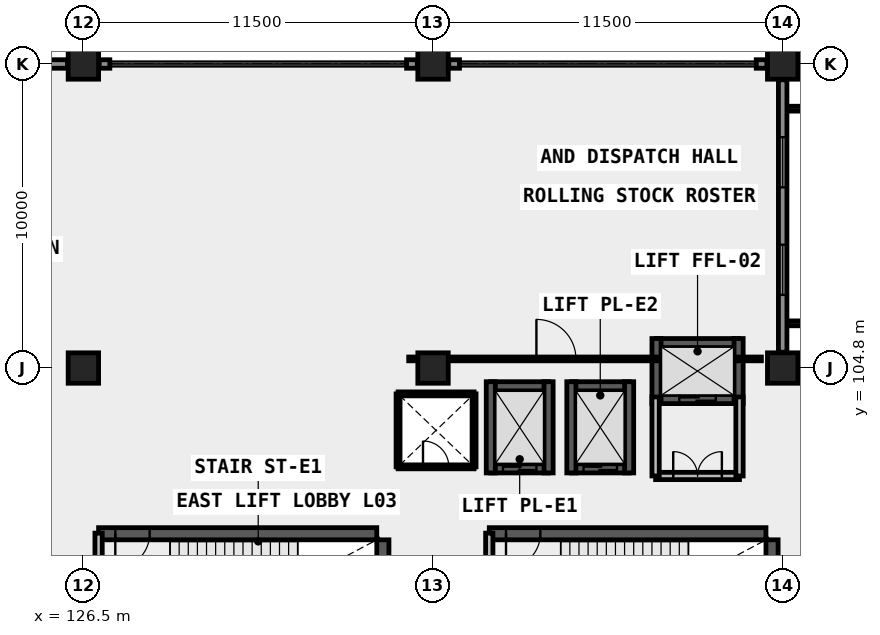
"""IFC4 building model, lengths in metres.
Left out: names, types, materials, properties, quantities, classifications, styles, units other than length and angle.
Written with IfcOpenShell. Run it as: python <this file> out.ifc"""

import sys

from ifc_helpers import new_model, si_unit, direction, frame, frame_2d, origin, origin_2d, place, context, subcontext, project, spatial, rectangle, extrude, element, fill, save


model = new_model("IFC4")
c1 = context("Model", 3, precision=1e-05, world=origin(), true_north=direction((0.0, 1.0)))
c2 = subcontext(c1, "Body", "Model", "MODEL_VIEW")
j1 = project(units=[si_unit("LENGTHUNIT", "METRE"), si_unit("PLANEANGLEUNIT", "RADIAN")], contexts=[c1])
p1 = place(None, origin())
s1 = spatial("IfcSite", under=j1, at=p1, CompositionType="ELEMENT")
p2 = place(p1, origin())
s2 = spatial("IfcBuilding", under=s1, at=p2, CompositionType="ELEMENT")
p3 = place(p2, frame((0.0, 0.0, 13.8)))
s3 = spatial("IfcBuildingStorey", under=s2, at=p3, CompositionType="ELEMENT", Elevation=13.8)
for number, where, z_axis, x_axis in (
    (1, (126.5, 104.8, 0.0), (0.0, 0.0, 1.0), (1.0, 0.0, 0.0)),
    (2, (126.5, 114.8, 0.0), (0.0, 0.0, 1.0), (1.0, 0.0, 0.0)),
    (3, (138.0, 104.8, 0.0), (0.0, 0.0, 1.0), (1.0, 0.0, 0.0)),
    (4, (138.0, 114.8, 0.0), (0.0, 0.0, 1.0), (1.0, 0.0, 0.0)),
    (5, (149.5, 104.8, 0.0), (0.0, 0.0, 1.0), (1.0, 0.0, 0.0)),
    (6, (149.5, 114.8, 0.0), (0.0, 0.0, 1.0), (1.0, 0.0, 0.0)),
):
    element("IfcColumn", number, at=place(p3, frame(where, z_axis=z_axis, x_axis=x_axis)), inside=s3, PredefinedType="COLUMN", context=c2, shape_type="SweptSolid", body=[
        extrude(rectangle(XDim=1.0, YDim=1.0, at=origin_2d()), origin(), (0.0, 0.0, 1.0), 4.5),
    ])
p4 = place(p3, frame((145.35, 103.78, 0.0), z_axis=(0.0, 0.0, 1.0), x_axis=(1.0, 0.0, 0.0)))
e7 = element("IfcWall", 7, at=p4, inside=s3, PredefinedType="SHEAR", context=c2, shape_type="SweptSolid", body=[
    extrude(rectangle(XDim=2.7, YDim=0.3, at=frame_2d((1.35, 0.0))), origin(), (0.0, 0.0, 1.0), 4.5),
])
p5 = place(p4, frame((0.75, 0.0, 0.0)))
e8 = element("IfcOpeningElement", 8, at=p5, cuts=e7, PredefinedType="OPENING", context=c2, shape_type="SweptSolid", body=[
    extrude(rectangle(XDim=1.2, YDim=2.15, at=frame_2d((0.6, 1.075))), frame((0.0, 0.16, 0.0), z_axis=(0.0, -1.0, 0.0), x_axis=(1.0, 0.0, 0.0)), (0.0, 0.0, 1.0), 0.32),
])
p6 = place(p3, frame((145.35, 105.62, 0.0), z_axis=(0.0, 0.0, 1.0), x_axis=(1.0, 0.0, 0.0)))
e9 = element("IfcWall", 9, at=p6, inside=s3, PredefinedType="SHEAR", context=c2, shape_type="SweptSolid", body=[
    extrude(rectangle(XDim=2.7, YDim=0.3, at=frame_2d((1.35, 0.0))), origin(), (0.0, 0.0, 1.0), 4.5),
])
for number, where, z_axis, x_axis in (
    (10, (145.35, 103.63, 0.0), (0.0, 0.0, 1.0), (0.0, 1.0, 0.0)),
    (11, (148.05, 103.63, 0.0), (0.0, 0.0, 1.0), (0.0, 1.0, 0.0)),
):
    element("IfcWall", number, at=place(p3, frame(where, z_axis=z_axis, x_axis=x_axis)), inside=s3, PredefinedType="SHEAR", context=c2, shape_type="SweptSolid", body=[
        extrude(rectangle(XDim=2.14, YDim=0.3, at=frame_2d((1.07, 0.0))), origin(), (0.0, 0.0, 1.0), 4.5),
    ])
p7 = place(p3, frame((139.9, 101.5, 0.0), z_axis=(0.0, 0.0, 1.0), x_axis=(1.0, 0.0, 0.0)))
e12 = element("IfcWall", 12, at=p7, inside=s3, PredefinedType="SHEAR", context=c2, shape_type="SweptSolid", body=[
    extrude(rectangle(XDim=1.9, YDim=0.3, at=frame_2d((0.95, 0.0))), origin(), (0.0, 0.0, 1.0), 4.5),
])
p8 = place(p7, frame((0.4, 0.0, 0.0)))
e13 = element("IfcOpeningElement", 13, at=p8, cuts=e12, PredefinedType="OPENING", context=c2, shape_type="SweptSolid", body=[
    extrude(rectangle(XDim=1.1, YDim=2.15, at=frame_2d((0.55, 1.075))), frame((0.0, 0.16, 0.0), z_axis=(0.0, -1.0, 0.0), x_axis=(1.0, 0.0, 0.0)), (0.0, 0.0, 1.0), 0.32),
])
p9 = place(p3, frame((139.9, 104.2, 0.0), z_axis=(0.0, 0.0, 1.0), x_axis=(1.0, 0.0, 0.0)))
e14 = element("IfcWall", 14, at=p9, inside=s3, PredefinedType="SHEAR", context=c2, shape_type="SweptSolid", body=[
    extrude(rectangle(XDim=1.9, YDim=0.3, at=frame_2d((0.95, 0.0))), origin(), (0.0, 0.0, 1.0), 4.5),
])
for number, where, z_axis, x_axis in (
    (15, (139.9, 101.35, 0.0), (0.0, 0.0, 1.0), (0.0, 1.0, 0.0)),
    (16, (141.8, 101.35, 0.0), (0.0, 0.0, 1.0), (0.0, 1.0, 0.0)),
):
    element("IfcWall", number, at=place(p3, frame(where, z_axis=z_axis, x_axis=x_axis)), inside=s3, PredefinedType="SHEAR", context=c2, shape_type="SweptSolid", body=[
        extrude(rectangle(XDim=3.0, YDim=0.3, at=frame_2d((1.5, 0.0))), origin(), (0.0, 0.0, 1.0), 4.5),
    ])
p10 = place(p3, frame((142.55, 101.5, 0.0), z_axis=(0.0, 0.0, 1.0), x_axis=(1.0, 0.0, 0.0)))
e17 = element("IfcWall", 17, at=p10, inside=s3, PredefinedType="SHEAR", context=c2, shape_type="SweptSolid", body=[
    extrude(rectangle(XDim=1.9, YDim=0.3, at=frame_2d((0.95, 0.0))), origin(), (0.0, 0.0, 1.0), 4.5),
])
p11 = place(p10, frame((0.4, 0.0, 0.0)))
e18 = element("IfcOpeningElement", 18, at=p11, cuts=e17, PredefinedType="OPENING", context=c2, shape_type="SweptSolid", body=[
    extrude(rectangle(XDim=1.1, YDim=2.15, at=frame_2d((0.55, 1.075))), frame((0.0, 0.16, 0.0), z_axis=(0.0, -1.0, 0.0), x_axis=(1.0, 0.0, 0.0)), (0.0, 0.0, 1.0), 0.32),
])
p12 = place(p3, frame((142.55, 104.2, 0.0), z_axis=(0.0, 0.0, 1.0), x_axis=(1.0, 0.0, 0.0)))
e19 = element("IfcWall", 19, at=p12, inside=s3, PredefinedType="SHEAR", context=c2, shape_type="SweptSolid", body=[
    extrude(rectangle(XDim=1.9, YDim=0.3, at=frame_2d((0.95, 0.0))), origin(), (0.0, 0.0, 1.0), 4.5),
])
for number, where, z_axis, x_axis in (
    (20, (142.55, 101.35, 0.0), (0.0, 0.0, 1.0), (0.0, 1.0, 0.0)),
    (21, (144.45, 101.35, 0.0), (0.0, 0.0, 1.0), (0.0, 1.0, 0.0)),
):
    element("IfcWall", number, at=place(p3, frame(where, z_axis=z_axis, x_axis=x_axis)), inside=s3, PredefinedType="SHEAR", context=c2, shape_type="SweptSolid", body=[
        extrude(rectangle(XDim=3.0, YDim=0.3, at=frame_2d((1.5, 0.0))), origin(), (0.0, 0.0, 1.0), 4.5),
    ])
p13 = place(p3, frame((127.0, 99.35, 0.0), z_axis=(0.0, 0.0, 1.0), x_axis=(1.0, 0.0, 0.0)))
e22 = element("IfcWall", 22, at=p13, inside=s3, PredefinedType="SHEAR", context=c2, shape_type="SweptSolid", body=[
    extrude(rectangle(XDim=9.15, YDim=0.4, at=frame_2d((4.575, 0.0))), origin(), (0.0, 0.0, 1.0), 4.5),
])
p14 = place(p13, frame((0.55, 0.0, 0.0)))
e23 = element("IfcOpeningElement", 23, at=p14, cuts=e22, PredefinedType="OPENING", context=c2, shape_type="SweptSolid", body=[
    extrude(rectangle(XDim=1.13, YDim=2.15, at=frame_2d((0.565, 1.075))), frame((0.0, 0.21, 0.0), z_axis=(0.0, -1.0, 0.0), x_axis=(1.0, 0.0, 0.0)), (0.0, 0.0, 1.0), 0.42),
])
p15 = place(p3, frame((136.35, 95.55, 0.0), z_axis=(0.0, 0.0, 1.0), x_axis=(0.0, 1.0, 0.0)))
e24 = element("IfcWall", 24, at=p15, inside=s3, PredefinedType="SHEAR", context=c2, shape_type="SweptSolid", body=[
    extrude(rectangle(XDim=3.6, YDim=0.4, at=frame_2d((1.8, 0.0))), origin(), (0.0, 0.0, 1.0), 4.5),
])
p16 = place(p3, frame((139.85, 99.35, 0.0), z_axis=(0.0, 0.0, 1.0), x_axis=(1.0, 0.0, 0.0)))
e25 = element("IfcWall", 25, at=p16, inside=s3, PredefinedType="SHEAR", context=c2, shape_type="SweptSolid", body=[
    extrude(rectangle(XDim=9.1, YDim=0.4, at=frame_2d((4.55, 0.0))), origin(), (0.0, 0.0, 1.0), 4.5),
])
p17 = place(p16, frame((0.55, 0.0, 0.0)))
e26 = element("IfcOpeningElement", 26, at=p17, cuts=e25, PredefinedType="OPENING", context=c2, shape_type="SweptSolid", body=[
    extrude(rectangle(XDim=1.13, YDim=2.15, at=frame_2d((0.565, 1.075))), frame((0.0, 0.21, 0.0), z_axis=(0.0, -1.0, 0.0), x_axis=(1.0, 0.0, 0.0)), (0.0, 0.0, 1.0), 0.42),
])
p18 = place(p3, frame((149.15, 95.32, 0.0), z_axis=(0.0, 0.0, 1.0), x_axis=(0.0, 1.0, 0.0)))
e27 = element("IfcWall", 27, at=p18, inside=s3, PredefinedType="SHEAR", context=c2, shape_type="SweptSolid", body=[
    extrude(rectangle(XDim=3.83, YDim=0.4, at=frame_2d((1.915, 0.0))), origin(), (0.0, 0.0, 1.0), 4.5),
])
p19 = place(p3, frame((150.02, 104.8, 0.0), z_axis=(0.0, 0.0, 1.0), x_axis=(1.0, 0.0, 0.0)))
e28 = element("IfcWall", 28, at=p19, inside=s3, PredefinedType="SOLIDWALL", context=c2, shape_type="SweptSolid", body=[
    extrude(rectangle(XDim=10.46, YDim=0.28, at=frame_2d((5.23, 0.0))), origin(), (0.0, 0.0, 1.0), 3.45),
])
p20 = place(p19, frame((2.12, 0.0, 0.85)))
e29 = element("IfcOpeningElement", 29, at=p20, cuts=e28, PredefinedType="OPENING", context=c2, shape_type="SweptSolid", body=[
    extrude(rectangle(XDim=2.05, YDim=1.9, at=frame_2d((1.025, 0.95))), frame((0.0, 0.15, 0.0), z_axis=(0.0, -1.0, 0.0), x_axis=(1.0, 0.0, 0.0)), (0.0, 0.0, 1.0), 0.3),
])
p21 = place(p19, frame((6.29, 0.0, 0.85)))
e30 = element("IfcOpeningElement", 30, at=p21, cuts=e28, PredefinedType="OPENING", context=c2, shape_type="SweptSolid", body=[
    extrude(rectangle(XDim=2.05, YDim=1.9, at=frame_2d((1.025, 0.95))), frame((0.0, 0.15, 0.0), z_axis=(0.0, -1.0, 0.0), x_axis=(1.0, 0.0, 0.0)), (0.0, 0.0, 1.0), 0.3),
])
p22 = place(p3, frame((149.5, 105.32, 0.0), z_axis=(0.0, 0.0, 1.0), x_axis=(0.0, 1.0, 0.0)))
e31 = element("IfcWall", 31, at=p22, inside=s3, PredefinedType="SOLIDWALL", context=c2, shape_type="SweptSolid", body=[
    extrude(rectangle(XDim=8.96, YDim=0.28, at=frame_2d((4.48, 0.0))), origin(), (0.0, 0.0, 1.0), 3.45),
])
p23 = place(p22, frame((1.887, 0.0, 0.85)))
e32 = element("IfcOpeningElement", 32, at=p23, cuts=e31, PredefinedType="OPENING", context=c2, shape_type="SweptSolid", body=[
    extrude(rectangle(XDim=1.65, YDim=1.9, at=frame_2d((0.825, 0.95))), frame((0.0, 0.15, 0.0), z_axis=(0.0, -1.0, 0.0), x_axis=(1.0, 0.0, 0.0)), (0.0, 0.0, 1.0), 0.3),
])
p24 = place(p22, frame((5.423, 0.0, 0.85)))
e33 = element("IfcOpeningElement", 33, at=p24, cuts=e31, PredefinedType="OPENING", context=c2, shape_type="SweptSolid", body=[
    extrude(rectangle(XDim=1.65, YDim=1.9, at=frame_2d((0.825, 0.95))), frame((0.0, 0.15, 0.0), z_axis=(0.0, -1.0, 0.0), x_axis=(1.0, 0.0, 0.0)), (0.0, 0.0, 1.0), 0.3),
])
p25 = place(p3, frame((115.52, 114.8, 0.0), z_axis=(0.0, 0.0, 1.0), x_axis=(1.0, 0.0, 0.0)))
e34 = element("IfcWall", 34, at=p25, inside=s3, PredefinedType="SOLIDWALL", context=c2, shape_type="SweptSolid", body=[
    extrude(rectangle(XDim=10.46, YDim=0.28, at=frame_2d((5.23, 0.0))), origin(), (0.0, 0.0, 1.0), 3.45),
])
p26 = place(p25, frame((2.12, 0.0, 0.85)))
e35 = element("IfcOpeningElement", 35, at=p26, cuts=e34, PredefinedType="OPENING", context=c2, shape_type="SweptSolid", body=[
    extrude(rectangle(XDim=2.05, YDim=1.9, at=frame_2d((1.025, 0.95))), frame((0.0, 0.15, 0.0), z_axis=(0.0, -1.0, 0.0), x_axis=(1.0, 0.0, 0.0)), (0.0, 0.0, 1.0), 0.3),
])
p27 = place(p25, frame((6.29, 0.0, 0.85)))
e36 = element("IfcOpeningElement", 36, at=p27, cuts=e34, PredefinedType="OPENING", context=c2, shape_type="SweptSolid", body=[
    extrude(rectangle(XDim=2.05, YDim=1.9, at=frame_2d((1.025, 0.95))), frame((0.0, 0.15, 0.0), z_axis=(0.0, -1.0, 0.0), x_axis=(1.0, 0.0, 0.0)), (0.0, 0.0, 1.0), 0.3),
])
for number, where, z_axis, x_axis in (
    (37, (127.02, 114.8, 0.0), (0.0, 0.0, 1.0), (1.0, 0.0, 0.0)),
    (38, (137.13, 114.8, 0.0), (0.0, 0.0, 1.0), (1.0, 0.0, 0.0)),
    (39, (138.52, 114.8, 0.0), (0.0, 0.0, 1.0), (1.0, 0.0, 0.0)),
    (40, (148.63, 114.8, 0.0), (0.0, 0.0, 1.0), (1.0, 0.0, 0.0)),
):
    element("IfcWall", number, at=place(p3, frame(where, z_axis=z_axis, x_axis=x_axis)), inside=s3, PredefinedType="SOLIDWALL", context=c2, shape_type="SweptSolid", body=[
        extrude(rectangle(XDim=0.35, YDim=0.28, at=frame_2d((0.175, 0.0))), origin(), (0.0, 0.0, 1.0), 4.23),
    ])
p28 = place(p3, frame((127.0, 95.33, 0.0), z_axis=(0.0, 0.0, 1.0), x_axis=(0.0, 1.0, 0.0)))
e41 = element("IfcWall", 41, at=p28, inside=s3, PredefinedType="SOLIDWALL", context=c2, shape_type="SweptSolid", body=[
    extrude(rectangle(XDim=4.04, YDim=0.24, at=frame_2d((2.02, 0.0))), origin(), (0.0, 0.0, 1.0), 4.22),
])
p29 = place(p28, frame((1.45, 0.0, 0.0)))
e42 = element("IfcOpeningElement", 42, at=p29, cuts=e41, PredefinedType="OPENING", context=c2, shape_type="SweptSolid", body=[
    extrude(rectangle(XDim=1.13, YDim=2.15, at=frame_2d((0.565, 1.075))), frame((0.0, 0.13, 0.0), z_axis=(0.0, -1.0, 0.0), x_axis=(1.0, 0.0, 0.0)), (0.0, 0.0, 1.0), 0.26),
])
p30 = place(p3, frame((139.85, 95.33, 0.0), z_axis=(0.0, 0.0, 1.0), x_axis=(0.0, 1.0, 0.0)))
e43 = element("IfcWall", 43, at=p30, inside=s3, PredefinedType="SOLIDWALL", context=c2, shape_type="SweptSolid", body=[
    extrude(rectangle(XDim=4.04, YDim=0.24, at=frame_2d((2.02, 0.0))), origin(), (0.0, 0.0, 1.0), 4.22),
])
p31 = place(p30, frame((1.45, 0.0, 0.0)))
e44 = element("IfcOpeningElement", 44, at=p31, cuts=e43, PredefinedType="OPENING", context=c2, shape_type="SweptSolid", body=[
    extrude(rectangle(XDim=1.13, YDim=2.15, at=frame_2d((0.565, 1.075))), frame((0.0, 0.13, 0.0), z_axis=(0.0, -1.0, 0.0), x_axis=(1.0, 0.0, 0.0)), (0.0, 0.0, 1.0), 0.26),
])
p32 = place(p3, frame((145.32, 101.25, 0.0), z_axis=(0.0, 0.0, 1.0), x_axis=(1.0, 0.0, 0.0)))
e45 = element("IfcWall", 45, at=p32, inside=s3, PredefinedType="SOLIDWALL", context=c2, shape_type="SweptSolid", body=[
    extrude(rectangle(XDim=2.76, YDim=0.24, at=frame_2d((1.38, 0.0))), origin(), (0.0, 0.0, 1.0), 4.22),
])
p33 = place(p32, frame((0.58, 0.0, 0.0)))
e46 = element("IfcOpeningElement", 46, at=p33, cuts=e45, PredefinedType="OPENING", context=c2, shape_type="SweptSolid", body=[
    extrude(rectangle(XDim=1.6, YDim=2.15, at=frame_2d((0.8, 1.075))), frame((0.0, 0.13, 0.0), z_axis=(0.0, -1.0, 0.0), x_axis=(1.0, 0.0, 0.0)), (0.0, 0.0, 1.0), 0.26),
])
for number, where, z_axis, x_axis in (
    (47, (145.32, 101.25, 0.0), (0.0, 0.0, 1.0), (0.0, 1.0, 0.0)),
    (48, (148.08, 101.25, 0.0), (0.0, 0.0, 1.0), (0.0, 1.0, 0.0)),
):
    element("IfcWall", number, at=place(p3, frame(where, z_axis=z_axis, x_axis=x_axis)), inside=s3, PredefinedType="SOLIDWALL", context=c2, shape_type="SweptSolid", body=[
        extrude(rectangle(XDim=2.6, YDim=0.24, at=frame_2d((1.3, 0.0))), origin(), (0.0, 0.0, 1.0), 4.22),
    ])
p34 = place(p3, frame((136.85, 101.55, 0.0), z_axis=(0.0, 0.0, 1.0), x_axis=(1.0, 0.0, 0.0)))
e49 = element("IfcWall", 49, at=p34, inside=s3, PredefinedType="PLUMBINGWALL", context=c2, shape_type="SweptSolid", body=[
    extrude(rectangle(XDim=2.5, YDim=0.13, at=frame_2d((1.25, 0.0))), origin(), (0.0, 0.0, 1.0), 4.22),
])
p35 = place(p34, frame((0.82, 0.0, 0.0)))
e50 = element("IfcOpeningElement", 50, at=p35, cuts=e49, PredefinedType="OPENING", context=c2, shape_type="SweptSolid", body=[
    extrude(rectangle(XDim=0.85, YDim=2.0, at=frame_2d((0.425, 1.0))), frame((0.0, 0.075, 0.0), z_axis=(0.0, -1.0, 0.0), x_axis=(1.0, 0.0, 0.0)), (0.0, 0.0, 1.0), 0.15),
])
for number, where, z_axis, x_axis in (
    (51, (136.85, 101.55, 0.0), (0.0, 0.0, 1.0), (0.0, 1.0, 0.0)),
    (52, (139.35, 101.55, 0.0), (0.0, 0.0, 1.0), (0.0, 1.0, 0.0)),
):
    element("IfcWall", number, at=place(p3, frame(where, z_axis=z_axis, x_axis=x_axis)), inside=s3, PredefinedType="PLUMBINGWALL", context=c2, shape_type="SweptSolid", body=[
        extrude(rectangle(XDim=2.4, YDim=0.13, at=frame_2d((1.2, 0.0))), origin(), (0.0, 0.0, 1.0), 4.22),
    ])
p36 = place(p3, frame((136.85, 103.95, 0.0), z_axis=(0.0, 0.0, 1.0), x_axis=(1.0, 0.0, 0.0)))
e53 = element("IfcWall", 53, at=p36, inside=s3, PredefinedType="PLUMBINGWALL", context=c2, shape_type="SweptSolid", body=[
    extrude(rectangle(XDim=2.5, YDim=0.13, at=frame_2d((1.25, 0.0))), origin(), (0.0, 0.0, 1.0), 4.22),
])
p37 = place(p3, frame((137.2, 105.1, 0.0), z_axis=(0.0, 0.0, 1.0), x_axis=(1.0, 0.0, 0.0)))
e54 = element("IfcWall", 54, at=p37, inside=s3, PredefinedType="MOVABLE", context=c2, shape_type="SweptSolid", body=[
    extrude(rectangle(XDim=11.6, YDim=0.125, at=frame_2d((5.8, 0.0))), origin(), (0.0, 0.0, 1.0), 4.22),
])
p38 = place(p37, frame((4.2, 0.0, 0.0)))
e55 = element("IfcOpeningElement", 55, at=p38, cuts=e54, PredefinedType="OPENING", context=c2, shape_type="SweptSolid", body=[
    extrude(rectangle(XDim=1.3, YDim=2.2, at=frame_2d((0.65, 1.1))), frame((0.0, 0.073, 0.0), z_axis=(0.0, -1.0, 0.0), x_axis=(1.0, 0.0, 0.0)), (0.0, 0.0, 1.0), 0.145),
])
p39 = place(p23, origin())
e56 = element("IfcWindow", 56, at=p39, inside=s3, PartitioningType="SINGLE_PANEL", PredefinedType="WINDOW", context=c2, shape_type="SweptSolid", body=[
    extrude(rectangle(XDim=1.65, YDim=1.9, at=frame_2d((0.825, 0.95))), frame((0.0, 0.03, 0.0), z_axis=(0.0, -1.0, 0.0), x_axis=(1.0, 0.0, 0.0)), (0.0, 0.0, 1.0), 0.06),
])
fill(e32, e56)
p40 = place(p24, origin())
e57 = element("IfcWindow", 57, at=p40, inside=s3, PartitioningType="SINGLE_PANEL", PredefinedType="WINDOW", context=c2, shape_type="SweptSolid", body=[
    extrude(rectangle(XDim=1.65, YDim=1.9, at=frame_2d((0.825, 0.95))), frame((0.0, 0.03, 0.0), z_axis=(0.0, -1.0, 0.0), x_axis=(1.0, 0.0, 0.0)), (0.0, 0.0, 1.0), 0.06),
])
fill(e33, e57)
p41 = place(p5, origin())
e58 = element("IfcDoor", 58, at=p41, inside=s3, OperationType="SLIDING_TO_RIGHT", PredefinedType="DOOR", context=c2, shape_type="SweptSolid", body=[
    extrude(rectangle(XDim=1.2, YDim=2.15, at=frame_2d((0.6, 1.075))), frame((0.0, 0.025, 0.0), z_axis=(0.0, -1.0, 0.0), x_axis=(1.0, 0.0, 0.0)), (0.0, 0.0, 1.0), 0.05),
])
fill(e8, e58)
p42 = place(p8, origin())
e59 = element("IfcDoor", 59, at=p42, inside=s3, OperationType="SLIDING_TO_LEFT", PredefinedType="DOOR", context=c2, shape_type="SweptSolid", body=[
    extrude(rectangle(XDim=1.1, YDim=2.15, at=frame_2d((0.55, 1.075))), frame((0.0, 0.025, 0.0), z_axis=(0.0, -1.0, 0.0), x_axis=(1.0, 0.0, 0.0)), (0.0, 0.0, 1.0), 0.05),
])
fill(e13, e59)
p43 = place(p11, origin())
e60 = element("IfcDoor", 60, at=p43, inside=s3, OperationType="SLIDING_TO_LEFT", PredefinedType="DOOR", context=c2, shape_type="SweptSolid", body=[
    extrude(rectangle(XDim=1.1, YDim=2.15, at=frame_2d((0.55, 1.075))), frame((0.0, 0.025, 0.0), z_axis=(0.0, -1.0, 0.0), x_axis=(1.0, 0.0, 0.0)), (0.0, 0.0, 1.0), 0.05),
])
fill(e18, e60)
p44 = place(p14, frame((0.565, 0.0, 0.0), z_axis=(0.0, 0.0, 1.0), x_axis=(-1.0, 0.0, 0.0)))
e61 = element("IfcDoor", 61, at=p44, inside=s3, OperationType="SINGLE_SWING_LEFT", PredefinedType="DOOR", context=c2, shape_type="SweptSolid", body=[
    extrude(rectangle(XDim=1.13, YDim=2.15, at=frame_2d((0.0, 1.075))), frame((0.0, 0.025, 0.0), z_axis=(0.0, -1.0, 0.0), x_axis=(1.0, 0.0, 0.0)), (0.0, 0.0, 1.0), 0.05),
])
fill(e23, e61)
p45 = place(p17, frame((0.565, 0.0, 0.0), z_axis=(0.0, 0.0, 1.0), x_axis=(-1.0, 0.0, 0.0)))
e62 = element("IfcDoor", 62, at=p45, inside=s3, OperationType="SINGLE_SWING_LEFT", PredefinedType="DOOR", context=c2, shape_type="SweptSolid", body=[
    extrude(rectangle(XDim=1.13, YDim=2.15, at=frame_2d((0.0, 1.075))), frame((0.0, 0.025, 0.0), z_axis=(0.0, -1.0, 0.0), x_axis=(1.0, 0.0, 0.0)), (0.0, 0.0, 1.0), 0.05),
])
fill(e26, e62)
p46 = place(p33, origin())
e63 = element("IfcDoor", 63, at=p46, inside=s3, OperationType="DOUBLE_DOOR_SINGLE_SWING", PredefinedType="DOOR", context=c2, shape_type="SweptSolid", body=[
    extrude(rectangle(XDim=1.6, YDim=2.15, at=frame_2d((0.8, 1.075))), frame((0.0, 0.025, 0.0), z_axis=(0.0, -1.0, 0.0), x_axis=(1.0, 0.0, 0.0)), (0.0, 0.0, 1.0), 0.05),
])
fill(e46, e63)
p47 = place(p35, origin())
e64 = element("IfcDoor", 64, at=p47, inside=s3, OperationType="SINGLE_SWING_LEFT", PredefinedType="TRAPDOOR", context=c2, shape_type="SweptSolid", body=[
    extrude(rectangle(XDim=0.85, YDim=2.0, at=frame_2d((0.425, 1.0))), frame((0.0, 0.025, 0.0), z_axis=(0.0, -1.0, 0.0), x_axis=(1.0, 0.0, 0.0)), (0.0, 0.0, 1.0), 0.05),
])
fill(e50, e64)
p48 = place(p38, origin())
e65 = element("IfcDoor", 65, at=p48, inside=s3, OperationType="SINGLE_SWING_LEFT", PredefinedType="DOOR", context=c2, shape_type="SweptSolid", body=[
    extrude(rectangle(XDim=1.3, YDim=2.2, at=frame_2d((0.65, 1.1))), frame((0.0, 0.025, 0.0), z_axis=(0.0, -1.0, 0.0), x_axis=(1.0, 0.0, 0.0)), (0.0, 0.0, 1.0), 0.05),
])
fill(e55, e65)
save(model, sys.argv[1])
